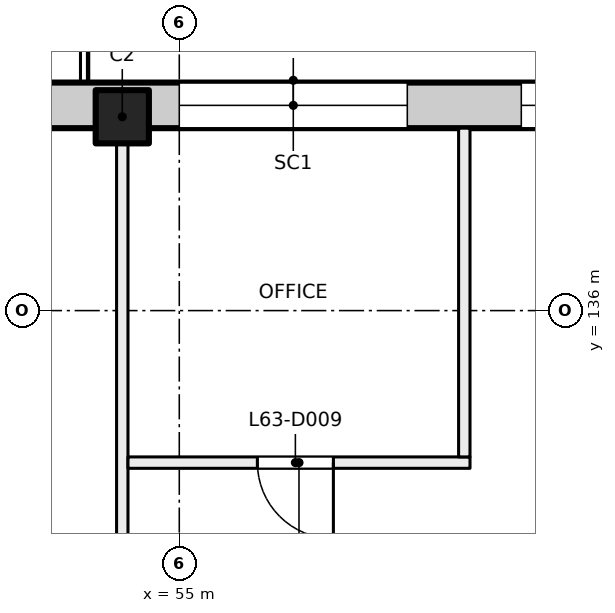
"""IFC4 building model, lengths in metres.
Left out: names, types, materials, properties, quantities, classifications, styles, units other than length and angle.
Written with IfcOpenShell. Run it as: python <this file> out.ifc"""

import sys

from ifc_helpers import new_model, si_unit, direction, frame, frame_2d, origin, origin_2d, place, context, subcontext, project, spatial, rectangle, extrude, element, fill, save


model = new_model("IFC4")
c1 = context("Model", 3, precision=1e-05, world=origin(), true_north=direction((0.0, 1.0)))
c2 = subcontext(c1, "Body", "Model", "MODEL_VIEW")
j1 = project(units=[si_unit("LENGTHUNIT", "METRE"), si_unit("PLANEANGLEUNIT", "RADIAN")], contexts=[c1])
p1 = place(None, origin())
s1 = spatial("IfcSite", under=j1, at=p1, CompositionType="ELEMENT")
p2 = place(p1, origin())
s2 = spatial("IfcBuilding", under=s1, at=p2, CompositionType="ELEMENT")
p3 = place(p2, frame((0.0, 0.0, 265.5)))
s3 = spatial("IfcBuildingStorey", under=s2, at=p3, CompositionType="ELEMENT", Elevation=265.5)
p4 = place(p3, frame((54.25, 138.55, 0.0), z_axis=(0.0, 0.0, 1.0), x_axis=(1.0, 0.0, 0.0)))
e1 = element("IfcColumn", 1, at=p4, inside=s3, PredefinedType="COLUMN", context=c2, shape_type="SweptSolid", body=[
    extrude(rectangle(XDim=0.7, YDim=0.7, at=origin_2d()), origin(), (0.0, 0.0, 1.0), 4.0),
])
p5 = place(p3, frame((47.07, 138.7, 0.0), z_axis=(0.0, 0.0, 1.0), x_axis=(1.0, 0.0, 0.0)))
e2 = element("IfcWall", 2, at=p5, inside=s3, PredefinedType="SOLIDWALL", context=c2, shape_type="SweptSolid", body=[
    extrude(rectangle(XDim=43.91, YDim=0.6, at=frame_2d((21.955, 0.0))), origin(), (0.0, 0.0, 1.0), 3.625),
])
p6 = place(p5, frame((4.03, 0.0, 0.0)))
e3 = element("IfcOpeningElement", 3, at=p6, cuts=e2, PredefinedType="OPENING", context=c2, shape_type="SweptSolid", body=[
    extrude(rectangle(XDim=1.8, YDim=2.4, at=frame_2d((0.9, 1.2))), frame((0.0, 0.31, 0.0), z_axis=(0.0, -1.0, 0.0), x_axis=(1.0, 0.0, 0.0)), (0.0, 0.0, 1.0), 0.62),
])
p7 = place(p5, frame((7.93, 0.0, 0.9)))
e4 = element("IfcOpeningElement", 4, at=p7, cuts=e2, PredefinedType="OPENING", context=c2, shape_type="SweptSolid", body=[
    extrude(rectangle(XDim=3.0, YDim=2.4, at=frame_2d((1.5, 1.2))), frame((0.0, 0.31, 0.0), z_axis=(0.0, -1.0, 0.0), x_axis=(1.0, 0.0, 0.0)), (0.0, 0.0, 1.0), 0.62),
])
p8 = place(p5, frame((12.43, 0.0, 0.9)))
e5 = element("IfcOpeningElement", 5, at=p8, cuts=e2, PredefinedType="OPENING", context=c2, shape_type="SweptSolid", body=[
    extrude(rectangle(XDim=3.0, YDim=2.4, at=frame_2d((1.5, 1.2))), frame((0.0, 0.31, 0.0), z_axis=(0.0, -1.0, 0.0), x_axis=(1.0, 0.0, 0.0)), (0.0, 0.0, 1.0), 0.62),
])
p9 = place(p5, frame((17.53, 0.0, 0.0)))
e6 = element("IfcOpeningElement", 6, at=p9, cuts=e2, PredefinedType="OPENING", context=c2, shape_type="SweptSolid", body=[
    extrude(rectangle(XDim=1.8, YDim=2.4, at=frame_2d((0.9, 1.2))), frame((0.0, 0.31, 0.0), z_axis=(0.0, -1.0, 0.0), x_axis=(1.0, 0.0, 0.0)), (0.0, 0.0, 1.0), 0.62),
])
p10 = place(p5, frame((21.43, 0.0, 0.9)))
e7 = element("IfcOpeningElement", 7, at=p10, cuts=e2, PredefinedType="OPENING", context=c2, shape_type="SweptSolid", body=[
    extrude(rectangle(XDim=3.0, YDim=2.4, at=frame_2d((1.5, 1.2))), frame((0.0, 0.31, 0.0), z_axis=(0.0, -1.0, 0.0), x_axis=(1.0, 0.0, 0.0)), (0.0, 0.0, 1.0), 0.62),
])
p11 = place(p5, frame((25.93, 0.0, 0.9)))
e8 = element("IfcOpeningElement", 8, at=p11, cuts=e2, PredefinedType="OPENING", context=c2, shape_type="SweptSolid", body=[
    extrude(rectangle(XDim=3.0, YDim=2.4, at=frame_2d((1.5, 1.2))), frame((0.0, 0.31, 0.0), z_axis=(0.0, -1.0, 0.0), x_axis=(1.0, 0.0, 0.0)), (0.0, 0.0, 1.0), 0.62),
])
p12 = place(p5, frame((30.43, 0.0, 0.9)))
e9 = element("IfcOpeningElement", 9, at=p12, cuts=e2, PredefinedType="OPENING", context=c2, shape_type="SweptSolid", body=[
    extrude(rectangle(XDim=3.0, YDim=2.4, at=frame_2d((1.5, 1.2))), frame((0.0, 0.31, 0.0), z_axis=(0.0, -1.0, 0.0), x_axis=(1.0, 0.0, 0.0)), (0.0, 0.0, 1.0), 0.62),
])
p13 = place(p5, frame((34.93, 0.0, 0.9)))
e10 = element("IfcOpeningElement", 10, at=p13, cuts=e2, PredefinedType="OPENING", context=c2, shape_type="SweptSolid", body=[
    extrude(rectangle(XDim=3.0, YDim=2.4, at=frame_2d((1.5, 1.2))), frame((0.0, 0.31, 0.0), z_axis=(0.0, -1.0, 0.0), x_axis=(1.0, 0.0, 0.0)), (0.0, 0.0, 1.0), 0.62),
])
p14 = place(p5, frame((39.43, 0.0, 0.9)))
e11 = element("IfcOpeningElement", 11, at=p14, cuts=e2, PredefinedType="OPENING", context=c2, shape_type="SweptSolid", body=[
    extrude(rectangle(XDim=3.0, YDim=2.4, at=frame_2d((1.5, 1.2))), frame((0.0, 0.31, 0.0), z_axis=(0.0, -1.0, 0.0), x_axis=(1.0, 0.0, 0.0)), (0.0, 0.0, 1.0), 0.62),
])
p15 = place(p3, frame((54.25, 121.35, 0.0), z_axis=(0.0, 0.0, 1.0), x_axis=(0.0, 1.0, 0.0)))
e12 = element("IfcWall", 12, at=p15, inside=s3, PredefinedType="PARTITIONING", context=c2, shape_type="SweptSolid", body=[
    extrude(rectangle(XDim=17.05, YDim=0.15, at=frame_2d((8.525, 0.0))), origin(), (0.0, 0.0, 1.0), 3.625),
])
p16 = place(p3, frame((58.825, 134.0, 0.0), z_axis=(0.0, 0.0, 1.0), x_axis=(-1.0, 0.0, 0.0)))
e13 = element("IfcWall", 13, at=p16, inside=s3, PredefinedType="PARTITIONING", context=c2, shape_type="SweptSolid", body=[
    extrude(rectangle(XDim=4.5, YDim=0.15, at=frame_2d((2.25, 0.0))), origin(), (0.0, 0.0, 1.0), 3.625),
])
p17 = place(p16, frame((1.798, 0.0, 0.0)))
e14 = element("IfcOpeningElement", 14, at=p17, cuts=e13, PredefinedType="OPENING", context=c2, shape_type="SweptSolid", body=[
    extrude(rectangle(XDim=1.0, YDim=2.1, at=frame_2d((0.5, 1.05))), frame((0.0, 0.085, 0.0), z_axis=(0.0, -1.0, 0.0), x_axis=(1.0, 0.0, 0.0)), (0.0, 0.0, 1.0), 0.17),
])
p18 = place(p3, frame((58.75, 138.4, 0.0), z_axis=(0.0, 0.0, 1.0), x_axis=(0.0, -1.0, 0.0)))
e15 = element("IfcWall", 15, at=p18, inside=s3, PredefinedType="PARTITIONING", context=c2, shape_type="SweptSolid", body=[
    extrude(rectangle(XDim=4.325, YDim=0.15, at=frame_2d((2.163, 0.0))), origin(), (0.0, 0.0, 1.0), 3.625),
])
p19 = place(p7, origin())
e16 = element("IfcWindow", 16, at=p19, inside=s3, PartitioningType="SINGLE_PANEL", PredefinedType="WINDOW", context=c2, shape_type="SweptSolid", body=[
    extrude(rectangle(XDim=3.0, YDim=2.4, at=frame_2d((1.5, 1.2))), frame((0.0, 0.03, 0.0), z_axis=(0.0, -1.0, 0.0), x_axis=(1.0, 0.0, 0.0)), (0.0, 0.0, 1.0), 0.06),
])
fill(e4, e16)
p20 = place(p8, origin())
e17 = element("IfcWindow", 17, at=p20, inside=s3, PartitioningType="SINGLE_PANEL", PredefinedType="WINDOW", context=c2, shape_type="SweptSolid", body=[
    extrude(rectangle(XDim=3.0, YDim=2.4, at=frame_2d((1.5, 1.2))), frame((0.0, 0.03, 0.0), z_axis=(0.0, -1.0, 0.0), x_axis=(1.0, 0.0, 0.0)), (0.0, 0.0, 1.0), 0.06),
])
fill(e5, e17)
p21 = place(p17, origin())
e18 = element("IfcDoor", 18, at=p21, inside=s3, OperationType="SINGLE_SWING_LEFT", PredefinedType="DOOR", context=c2, shape_type="SweptSolid", body=[
    extrude(rectangle(XDim=1.0, YDim=2.1, at=frame_2d((0.5, 1.05))), frame((0.0, 0.025, 0.0), z_axis=(0.0, -1.0, 0.0), x_axis=(1.0, 0.0, 0.0)), (0.0, 0.0, 1.0), 0.05),
])
fill(e14, e18)
save(model, sys.argv[1])
